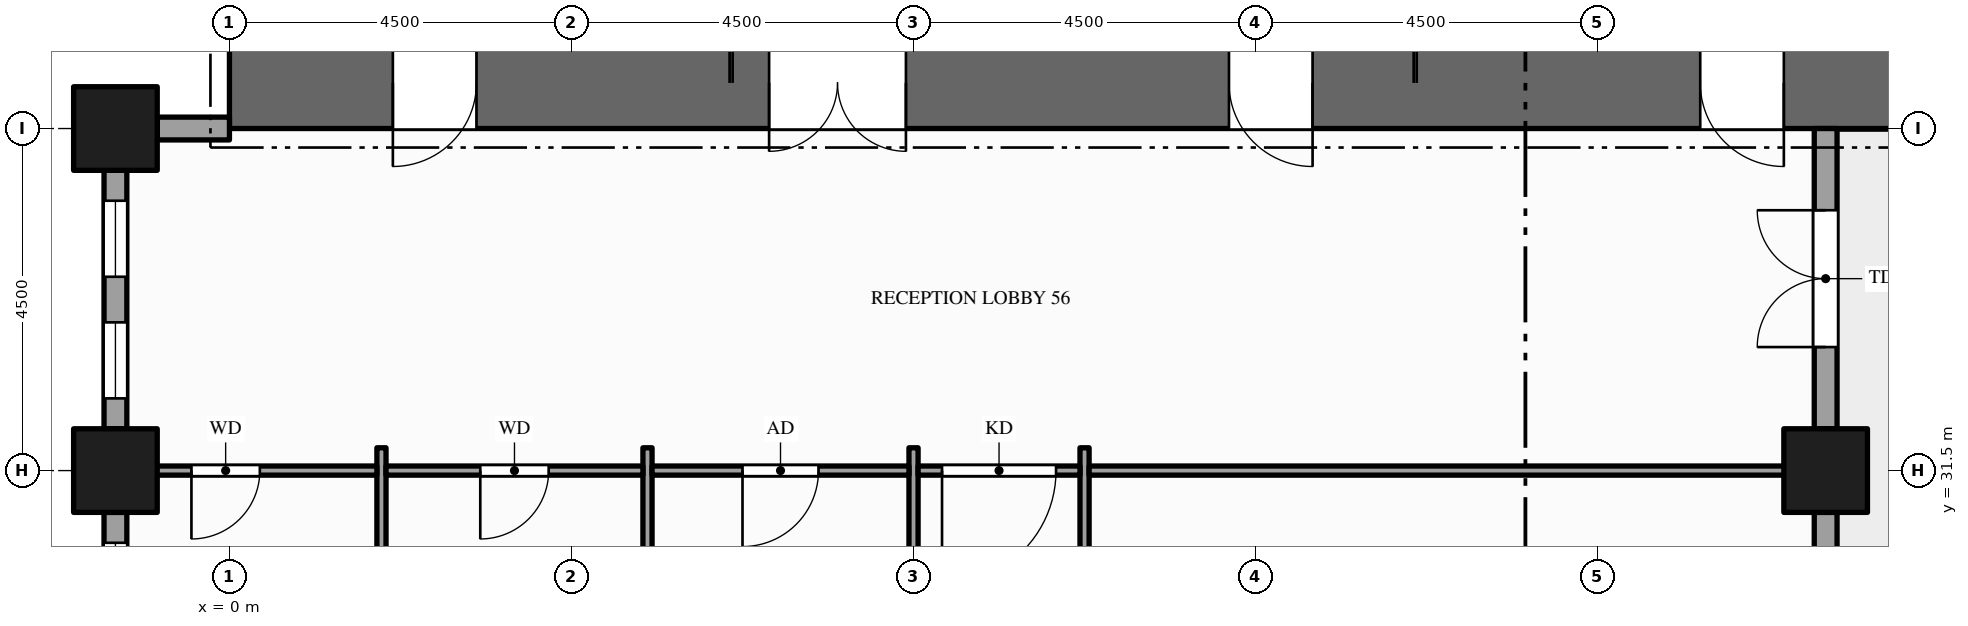
"""IFC4 building model, lengths in metres.
Left out: names, types, materials, properties, quantities, classifications, styles, units other than length and angle.
Written with IfcOpenShell. Run it as: python <this file> out.ifc"""

import sys

from ifc_helpers import new_model, si_unit, direction, frame, frame_2d, origin, origin_2d, place, context, subcontext, project, spatial, rectangle, hollow_rectangle, extrude, element, fill, save


model = new_model("IFC4")
c1 = context("Model", 3, precision=1e-05, world=origin(), true_north=direction((0.0, 1.0)))
c2 = subcontext(c1, "Body", "Model", "MODEL_VIEW")
j1 = project(units=[si_unit("LENGTHUNIT", "METRE"), si_unit("PLANEANGLEUNIT", "RADIAN")], contexts=[c1])
p1 = place(None, origin())
s1 = spatial("IfcSite", under=j1, at=p1, CompositionType="ELEMENT")
p2 = place(p1, origin())
s2 = spatial("IfcBuilding", under=s1, at=p2, CompositionType="ELEMENT")
p3 = place(p2, frame((0.0, 0.0, 29.0)))
s3 = spatial("IfcBuildingStorey", under=s2, at=p3, CompositionType="ELEMENT", Elevation=29.0)
p4 = place(p3, frame((0.0, 36.6, -0.15), z_axis=(0.0, 0.0, 1.0), x_axis=(1.0, 0.0, 0.0)))
e1 = element("IfcWall", 1, at=p4, inside=s3, PredefinedType="SHEAR", context=c2, shape_type="SweptSolid", body=[
    extrude(rectangle(XDim=22.5, YDim=1.2, at=frame_2d((11.25, 0.0))), origin(), (0.0, 0.0, 1.0), 4.0),
])
p5 = place(p4, frame((7.1, 0.0, 0.15)))
e2 = element("IfcOpeningElement", 2, at=p5, cuts=e1, PredefinedType="OPENING", context=c2, shape_type="SweptSolid", body=[
    extrude(rectangle(XDim=1.8, YDim=2.1, at=frame_2d((0.9, 1.05))), frame((0.0, 0.61, 0.0), z_axis=(0.0, -1.0, 0.0), x_axis=(1.0, 0.0, 0.0)), (0.0, 0.0, 1.0), 1.22),
])
p6 = place(p4, frame((13.15, 0.0, 0.15)))
e3 = element("IfcOpeningElement", 3, at=p6, cuts=e1, PredefinedType="OPENING", context=c2, shape_type="SweptSolid", body=[
    extrude(rectangle(XDim=1.1, YDim=2.1, at=frame_2d((0.55, 1.05))), frame((0.0, 0.61, 0.0), z_axis=(0.0, -1.0, 0.0), x_axis=(1.0, 0.0, 0.0)), (0.0, 0.0, 1.0), 1.22),
])
p7 = place(p4, frame((2.15, 0.0, 0.15)))
e4 = element("IfcOpeningElement", 4, at=p7, cuts=e1, PredefinedType="OPENING", context=c2, shape_type="SweptSolid", body=[
    extrude(rectangle(XDim=1.1, YDim=2.1, at=frame_2d((0.55, 1.05))), frame((0.0, 0.61, 0.0), z_axis=(0.0, -1.0, 0.0), x_axis=(1.0, 0.0, 0.0)), (0.0, 0.0, 1.0), 1.22),
])
p8 = place(p4, frame((19.35, 0.0, 0.15)))
e5 = element("IfcOpeningElement", 5, at=p8, cuts=e1, PredefinedType="OPENING", context=c2, shape_type="SweptSolid", body=[
    extrude(rectangle(XDim=1.1, YDim=2.1, at=frame_2d((0.55, 1.05))), frame((0.0, 0.61, 0.0), z_axis=(0.0, -1.0, 0.0), x_axis=(1.0, 0.0, 0.0)), (0.0, 0.0, 1.0), 1.22),
])
for number, where, z_axis, x_axis in (
    (6, (-1.5, 31.5, -0.15), (0.0, 0.0, 1.0), (1.0, 0.0, 0.0)),
    (7, (-1.5, 36.0, -0.15), (0.0, 0.0, 1.0), (1.0, 0.0, 0.0)),
):
    element("IfcColumn", number, at=place(p3, frame(where, z_axis=z_axis, x_axis=x_axis)), inside=s3, PredefinedType="COLUMN", context=c2, shape_type="SweptSolid", body=[
        extrude(hollow_rectangle(XDim=1.1, YDim=1.1, WallThickness=0.06, at=origin_2d()), origin(), (0.0, 0.0, 1.0), 4.0),
    ])
p9 = place(p3, frame((21.0, 31.5, -0.3), z_axis=(0.0, 0.0, 1.0), x_axis=(1.0, 0.0, 0.0)))
e8 = element("IfcColumn", 8, at=p9, inside=s3, PredefinedType="COLUMN", context=c2, shape_type="SweptSolid", body=[
    extrude(hollow_rectangle(XDim=1.1, YDim=1.1, WallThickness=0.06, at=origin_2d()), origin(), (0.0, 0.0, 1.0), 4.15),
])
p10 = place(p3, frame((21.0, 29.05, 0.0), z_axis=(0.0, 0.0, 1.0), x_axis=(0.0, 1.0, 0.0)))
e9 = element("IfcWall", 9, at=p10, inside=s3, PredefinedType="STANDARD", context=c2, shape_type="SweptSolid", body=[
    extrude(rectangle(XDim=1.9, YDim=0.3, at=frame_2d((0.95, 0.0))), origin(), (0.0, 0.0, 1.0), 3.144),
])
p11 = place(p3, frame((21.0, 32.05, 0.0), z_axis=(0.0, 0.0, 1.0), x_axis=(0.0, 1.0, 0.0)))
e10 = element("IfcWall", 10, at=p11, inside=s3, PredefinedType="STANDARD", context=c2, shape_type="SweptSolid", body=[
    extrude(rectangle(XDim=3.95, YDim=0.3, at=frame_2d((1.975, 0.0))), origin(), (0.0, 0.0, 1.0), 3.144),
])
p12 = place(p11, frame((1.075, 0.0, 0.0)))
e11 = element("IfcOpeningElement", 11, at=p12, cuts=e10, PredefinedType="OPENING", context=c2, shape_type="SweptSolid", body=[
    extrude(rectangle(XDim=1.8, YDim=2.4, at=frame_2d((0.9, 1.2))), frame((0.0, 0.16, 0.0), z_axis=(0.0, -1.0, 0.0), x_axis=(1.0, 0.0, 0.0)), (0.0, 0.0, 1.0), 0.32),
])
p13 = place(p3, frame((0.0, 36.0, 0.0), z_axis=(0.0, 0.0, 1.0), x_axis=(-1.0, 0.0, 0.0)))
e12 = element("IfcWall", 12, at=p13, inside=s3, PredefinedType="STANDARD", context=c2, shape_type="SweptSolid", body=[
    extrude(rectangle(XDim=0.95, YDim=0.3, at=frame_2d((0.475, 0.0))), origin(), (0.0, 0.0, 1.0), 2.938),
])
p14 = place(p3, frame((-1.5, 35.45, 0.0), z_axis=(0.0, 0.0, 1.0), x_axis=(0.0, -1.0, 0.0)))
e13 = element("IfcWall", 13, at=p14, inside=s3, PredefinedType="STANDARD", context=c2, shape_type="SweptSolid", body=[
    extrude(rectangle(XDim=3.4, YDim=0.3, at=frame_2d((1.7, 0.0))), origin(), (0.0, 0.0, 1.0), 3.144),
])
p15 = place(p14, frame((0.4, 0.0, 0.9)))
e14 = element("IfcOpeningElement", 14, at=p15, cuts=e13, PredefinedType="OPENING", context=c2, shape_type="SweptSolid", body=[
    extrude(rectangle(XDim=1.0, YDim=2.0, at=frame_2d((0.5, 1.0))), frame((0.0, 0.16, 0.0), z_axis=(0.0, -1.0, 0.0), x_axis=(1.0, 0.0, 0.0)), (0.0, 0.0, 1.0), 0.32),
])
p16 = place(p14, frame((2.0, 0.0, 0.9)))
e15 = element("IfcOpeningElement", 15, at=p16, cuts=e13, PredefinedType="OPENING", context=c2, shape_type="SweptSolid", body=[
    extrude(rectangle(XDim=1.0, YDim=2.0, at=frame_2d((0.5, 1.0))), frame((0.0, 0.16, 0.0), z_axis=(0.0, -1.0, 0.0), x_axis=(1.0, 0.0, 0.0)), (0.0, 0.0, 1.0), 0.32),
])
p17 = place(p3, frame((-1.5, 30.95, 0.0), z_axis=(0.0, 0.0, 1.0), x_axis=(0.0, -1.0, 0.0)))
e16 = element("IfcWall", 16, at=p17, inside=s3, PredefinedType="STANDARD", context=c2, shape_type="SweptSolid", body=[
    extrude(rectangle(XDim=3.4, YDim=0.3, at=frame_2d((1.7, 0.0))), origin(), (0.0, 0.0, 1.0), 3.144),
])
p18 = place(p17, frame((0.4, 0.0, 0.9)))
e17 = element("IfcOpeningElement", 17, at=p18, cuts=e16, PredefinedType="OPENING", context=c2, shape_type="SweptSolid", body=[
    extrude(rectangle(XDim=1.0, YDim=2.0, at=frame_2d((0.5, 1.0))), frame((0.0, 0.16, 0.0), z_axis=(0.0, -1.0, 0.0), x_axis=(1.0, 0.0, 0.0)), (0.0, 0.0, 1.0), 0.32),
])
p19 = place(p17, frame((2.0, 0.0, 0.9)))
e18 = element("IfcOpeningElement", 18, at=p19, cuts=e16, PredefinedType="OPENING", context=c2, shape_type="SweptSolid", body=[
    extrude(rectangle(XDim=1.0, YDim=2.0, at=frame_2d((0.5, 1.0))), frame((0.0, 0.16, 0.0), z_axis=(0.0, -1.0, 0.0), x_axis=(1.0, 0.0, 0.0)), (0.0, 0.0, 1.0), 0.32),
])
for number, where, z_axis, x_axis in (
    (19, (2.0, 26.7, 0.0), (0.0, 0.0, 1.0), (0.0, 1.0, 0.0)),
    (20, (5.5, 26.7, 0.0), (0.0, 0.0, 1.0), (0.0, 1.0, 0.0)),
):
    element("IfcWall", number, at=place(p3, frame(where, z_axis=z_axis, x_axis=x_axis)), inside=s3, PredefinedType="PARTITIONING", context=c2, shape_type="SweptSolid", body=[
        extrude(rectangle(XDim=5.1, YDim=0.12, at=frame_2d((2.55, 0.0))), origin(), (0.0, 0.0, 1.0), 3.85),
    ])
p20 = place(p3, frame((9.0, 10.95, 0.0), z_axis=(0.0, 0.0, 1.0), x_axis=(0.0, 1.0, 0.0)))
e21 = element("IfcWall", 21, at=p20, inside=s3, PredefinedType="PARTITIONING", context=c2, shape_type="SweptSolid", body=[
    extrude(rectangle(XDim=20.85, YDim=0.12, at=frame_2d((10.425, 0.0))), origin(), (0.0, 0.0, 1.0), 2.6),
])
p21 = place(p20, frame((2.05, 0.0, 0.0)))
e22 = element("IfcOpeningElement", 22, at=p21, cuts=e21, PredefinedType="OPENING", context=c2, shape_type="SweptSolid", body=[
    extrude(rectangle(XDim=1.0, YDim=2.1, at=frame_2d((0.5, 1.05))), frame((0.0, 0.07, 0.0), z_axis=(0.0, -1.0, 0.0), x_axis=(1.0, 0.0, 0.0)), (0.0, 0.0, 1.0), 0.14),
])
p22 = place(p20, frame((6.6, 0.0, 0.0)))
e23 = element("IfcOpeningElement", 23, at=p22, cuts=e21, PredefinedType="OPENING", context=c2, shape_type="SweptSolid", body=[
    extrude(rectangle(XDim=0.9, YDim=2.1, at=frame_2d((0.45, 1.05))), frame((0.0, 0.07, 0.0), z_axis=(0.0, -1.0, 0.0), x_axis=(1.0, 0.0, 0.0)), (0.0, 0.0, 1.0), 0.14),
])
p23 = place(p20, frame((11.805, 0.0, 0.0)))
e24 = element("IfcOpeningElement", 24, at=p23, cuts=e21, PredefinedType="OPENING", context=c2, shape_type="SweptSolid", body=[
    extrude(rectangle(XDim=1.8, YDim=2.1, at=frame_2d((0.9, 1.05))), frame((0.0, 0.07, 0.0), z_axis=(0.0, -1.0, 0.0), x_axis=(1.0, 0.0, 0.0)), (0.0, 0.0, 1.0), 0.14),
])
p24 = place(p3, frame((11.25, 10.95, 0.0), z_axis=(0.0, 0.0, 1.0), x_axis=(0.0, 1.0, 0.0)))
e25 = element("IfcWall", 25, at=p24, inside=s3, PredefinedType="PARTITIONING", context=c2, shape_type="SweptSolid", body=[
    extrude(rectangle(XDim=20.85, YDim=0.12, at=frame_2d((10.425, 0.0))), origin(), (0.0, 0.0, 1.0), 2.6),
])
p25 = place(p24, frame((17.85, 0.0, 0.0)))
e26 = element("IfcOpeningElement", 26, at=p25, cuts=e25, PredefinedType="OPENING", context=c2, shape_type="SweptSolid", body=[
    extrude(rectangle(XDim=0.9, YDim=2.1, at=frame_2d((0.45, 1.05))), frame((0.0, 0.07, 0.0), z_axis=(0.0, -1.0, 0.0), x_axis=(1.0, 0.0, 0.0)), (0.0, 0.0, 1.0), 0.14),
])
p26 = place(p24, frame((4.2, 0.0, 0.0)))
e27 = element("IfcOpeningElement", 27, at=p26, cuts=e25, PredefinedType="OPENING", context=c2, shape_type="SweptSolid", body=[
    extrude(rectangle(XDim=1.2, YDim=2.1, at=frame_2d((0.6, 1.05))), frame((0.0, 0.07, 0.0), z_axis=(0.0, -1.0, 0.0), x_axis=(1.0, 0.0, 0.0)), (0.0, 0.0, 1.0), 0.14),
])
p27 = place(p3, frame((-1.35, 31.5, 0.0), z_axis=(0.0, 0.0, 1.0), x_axis=(1.0, 0.0, 0.0)))
e28 = element("IfcWall", 28, at=p27, inside=s3, PredefinedType="PARTITIONING", context=c2, shape_type="SweptSolid", body=[
    extrude(rectangle(XDim=3.29, YDim=0.12, at=frame_2d((1.645, 0.0))), origin(), (0.0, 0.0, 1.0), 2.938),
])
p28 = place(p27, frame((0.85, 0.0, 0.0)))
e29 = element("IfcOpeningElement", 29, at=p28, cuts=e28, PredefinedType="OPENING", context=c2, shape_type="SweptSolid", body=[
    extrude(rectangle(XDim=0.9, YDim=2.1, at=frame_2d((0.45, 1.05))), frame((0.0, 0.07, 0.0), z_axis=(0.0, -1.0, 0.0), x_axis=(1.0, 0.0, 0.0)), (0.0, 0.0, 1.0), 0.14),
])
p29 = place(p3, frame((2.06, 31.5, 0.0), z_axis=(0.0, 0.0, 1.0), x_axis=(1.0, 0.0, 0.0)))
e30 = element("IfcWall", 30, at=p29, inside=s3, PredefinedType="PARTITIONING", context=c2, shape_type="SweptSolid", body=[
    extrude(rectangle(XDim=3.38, YDim=0.12, at=frame_2d((1.69, 0.0))), origin(), (0.0, 0.0, 1.0), 2.938),
])
p30 = place(p29, frame((1.24, 0.0, 0.0)))
e31 = element("IfcOpeningElement", 31, at=p30, cuts=e30, PredefinedType="OPENING", context=c2, shape_type="SweptSolid", body=[
    extrude(rectangle(XDim=0.9, YDim=2.1, at=frame_2d((0.45, 1.05))), frame((0.0, 0.07, 0.0), z_axis=(0.0, -1.0, 0.0), x_axis=(1.0, 0.0, 0.0)), (0.0, 0.0, 1.0), 0.14),
])
p31 = place(p3, frame((5.56, 31.5, 0.0), z_axis=(0.0, 0.0, 1.0), x_axis=(1.0, 0.0, 0.0)))
e32 = element("IfcWall", 32, at=p31, inside=s3, PredefinedType="PARTITIONING", context=c2, shape_type="SweptSolid", body=[
    extrude(rectangle(XDim=3.38, YDim=0.12, at=frame_2d((1.69, 0.0))), origin(), (0.0, 0.0, 1.0), 2.938),
])
p32 = place(p31, frame((1.19, 0.0, 0.0)))
e33 = element("IfcOpeningElement", 33, at=p32, cuts=e32, PredefinedType="OPENING", context=c2, shape_type="SweptSolid", body=[
    extrude(rectangle(XDim=1.0, YDim=2.1, at=frame_2d((0.5, 1.05))), frame((0.0, 0.07, 0.0), z_axis=(0.0, -1.0, 0.0), x_axis=(1.0, 0.0, 0.0)), (0.0, 0.0, 1.0), 0.14),
])
p33 = place(p3, frame((9.06, 31.5, 0.0), z_axis=(0.0, 0.0, 1.0), x_axis=(1.0, 0.0, 0.0)))
e34 = element("IfcWall", 34, at=p33, inside=s3, PredefinedType="PARTITIONING", context=c2, shape_type="SweptSolid", body=[
    extrude(rectangle(XDim=2.13, YDim=0.12, at=frame_2d((1.065, 0.0))), origin(), (0.0, 0.0, 1.0), 2.938),
])
p34 = place(p33, frame((0.315, 0.0, 0.0)))
e35 = element("IfcOpeningElement", 35, at=p34, cuts=e34, PredefinedType="OPENING", context=c2, shape_type="SweptSolid", body=[
    extrude(rectangle(XDim=1.5, YDim=2.1, at=frame_2d((0.75, 1.05))), frame((0.0, 0.07, 0.0), z_axis=(0.0, -1.0, 0.0), x_axis=(1.0, 0.0, 0.0)), (0.0, 0.0, 1.0), 0.14),
])
p35 = place(p3, frame((11.31, 31.5, 0.0), z_axis=(0.0, 0.0, 1.0), x_axis=(1.0, 0.0, 0.0)))
e36 = element("IfcWall", 36, at=p35, inside=s3, PredefinedType="PARTITIONING", context=c2, shape_type="SweptSolid", body=[
    extrude(rectangle(XDim=9.54, YDim=0.12, at=frame_2d((4.77, 0.0))), origin(), (0.0, 0.0, 1.0), 2.938),
])
p36 = place(p12, origin())
e37 = element("IfcDoor", 37, at=p36, inside=s3, OperationType="DOUBLE_DOOR_SINGLE_SWING", PredefinedType="DOOR", context=c2, shape_type="SweptSolid", body=[
    extrude(rectangle(XDim=1.8, YDim=2.4, at=frame_2d((0.9, 1.2))), frame((0.0, 0.025, 0.0), z_axis=(0.0, -1.0, 0.0), x_axis=(1.0, 0.0, 0.0)), (0.0, 0.0, 1.0), 0.05),
])
fill(e11, e37)
p37 = place(p15, origin())
e38 = element("IfcWindow", 38, at=p37, inside=s3, PartitioningType="SINGLE_PANEL", PredefinedType="WINDOW", context=c2, shape_type="SweptSolid", body=[
    extrude(rectangle(XDim=1.0, YDim=2.0, at=frame_2d((0.5, 1.0))), frame((0.0, 0.03, 0.0), z_axis=(0.0, -1.0, 0.0), x_axis=(1.0, 0.0, 0.0)), (0.0, 0.0, 1.0), 0.06),
])
fill(e14, e38)
p38 = place(p16, origin())
e39 = element("IfcWindow", 39, at=p38, inside=s3, PartitioningType="SINGLE_PANEL", PredefinedType="WINDOW", context=c2, shape_type="SweptSolid", body=[
    extrude(rectangle(XDim=1.0, YDim=2.0, at=frame_2d((0.5, 1.0))), frame((0.0, 0.03, 0.0), z_axis=(0.0, -1.0, 0.0), x_axis=(1.0, 0.0, 0.0)), (0.0, 0.0, 1.0), 0.06),
])
fill(e15, e39)
p39 = place(p18, origin())
e40 = element("IfcWindow", 40, at=p39, inside=s3, PartitioningType="SINGLE_PANEL", PredefinedType="WINDOW", context=c2, shape_type="SweptSolid", body=[
    extrude(rectangle(XDim=1.0, YDim=2.0, at=frame_2d((0.5, 1.0))), frame((0.0, 0.03, 0.0), z_axis=(0.0, -1.0, 0.0), x_axis=(1.0, 0.0, 0.0)), (0.0, 0.0, 1.0), 0.06),
])
fill(e17, e40)
p40 = place(p5, origin())
e41 = element("IfcDoor", 41, at=p40, inside=s3, OperationType="DOUBLE_DOOR_SINGLE_SWING", PredefinedType="DOOR", context=c2, shape_type="SweptSolid", body=[
    extrude(rectangle(XDim=1.8, YDim=2.1, at=frame_2d((0.9, 1.05))), frame((0.0, 0.025, 0.0), z_axis=(0.0, -1.0, 0.0), x_axis=(1.0, 0.0, 0.0)), (0.0, 0.0, 1.0), 0.05),
])
fill(e2, e41)
p41 = place(p6, origin())
e42 = element("IfcDoor", 42, at=p41, inside=s3, OperationType="SINGLE_SWING_RIGHT", PredefinedType="DOOR", context=c2, shape_type="SweptSolid", body=[
    extrude(rectangle(XDim=1.1, YDim=2.1, at=frame_2d((0.55, 1.05))), frame((0.0, 0.025, 0.0), z_axis=(0.0, -1.0, 0.0), x_axis=(1.0, 0.0, 0.0)), (0.0, 0.0, 1.0), 0.05),
])
fill(e3, e42)
p42 = place(p7, origin())
e43 = element("IfcDoor", 43, at=p42, inside=s3, OperationType="SINGLE_SWING_LEFT", PredefinedType="DOOR", context=c2, shape_type="SweptSolid", body=[
    extrude(rectangle(XDim=1.1, YDim=2.1, at=frame_2d((0.55, 1.05))), frame((0.0, 0.025, 0.0), z_axis=(0.0, -1.0, 0.0), x_axis=(1.0, 0.0, 0.0)), (0.0, 0.0, 1.0), 0.05),
])
fill(e4, e43)
p43 = place(p8, origin())
e44 = element("IfcDoor", 44, at=p43, inside=s3, OperationType="SINGLE_SWING_RIGHT", PredefinedType="DOOR", context=c2, shape_type="SweptSolid", body=[
    extrude(rectangle(XDim=1.1, YDim=2.1, at=frame_2d((0.55, 1.05))), frame((0.0, 0.025, 0.0), z_axis=(0.0, -1.0, 0.0), x_axis=(1.0, 0.0, 0.0)), (0.0, 0.0, 1.0), 0.05),
])
fill(e5, e44)
p44 = place(p34, origin())
e45 = element("IfcDoor", 45, at=p44, inside=s3, OperationType="SINGLE_SWING_LEFT", PredefinedType="DOOR", context=c2, shape_type="SweptSolid", body=[
    extrude(rectangle(XDim=1.5, YDim=2.1, at=frame_2d((0.75, 1.05))), frame((0.0, 0.025, 0.0), z_axis=(0.0, -1.0, 0.0), x_axis=(1.0, 0.0, 0.0)), (0.0, 0.0, 1.0), 0.05),
])
fill(e35, e45)
p45 = place(p28, origin())
e46 = element("IfcDoor", 46, at=p45, inside=s3, OperationType="SINGLE_SWING_LEFT", PredefinedType="DOOR", context=c2, shape_type="SweptSolid", body=[
    extrude(rectangle(XDim=0.9, YDim=2.1, at=frame_2d((0.45, 1.05))), frame((0.0, 0.025, 0.0), z_axis=(0.0, -1.0, 0.0), x_axis=(1.0, 0.0, 0.0)), (0.0, 0.0, 1.0), 0.05),
])
fill(e29, e46)
p46 = place(p30, origin())
e47 = element("IfcDoor", 47, at=p46, inside=s3, OperationType="SINGLE_SWING_LEFT", PredefinedType="DOOR", context=c2, shape_type="SweptSolid", body=[
    extrude(rectangle(XDim=0.9, YDim=2.1, at=frame_2d((0.45, 1.05))), frame((0.0, 0.025, 0.0), z_axis=(0.0, -1.0, 0.0), x_axis=(1.0, 0.0, 0.0)), (0.0, 0.0, 1.0), 0.05),
])
fill(e31, e47)
p47 = place(p32, origin())
e48 = element("IfcDoor", 48, at=p47, inside=s3, OperationType="SINGLE_SWING_LEFT", PredefinedType="DOOR", context=c2, shape_type="SweptSolid", body=[
    extrude(rectangle(XDim=1.0, YDim=2.1, at=frame_2d((0.5, 1.05))), frame((0.0, 0.025, 0.0), z_axis=(0.0, -1.0, 0.0), x_axis=(1.0, 0.0, 0.0)), (0.0, 0.0, 1.0), 0.05),
])
fill(e33, e48)
save(model, sys.argv[1])
